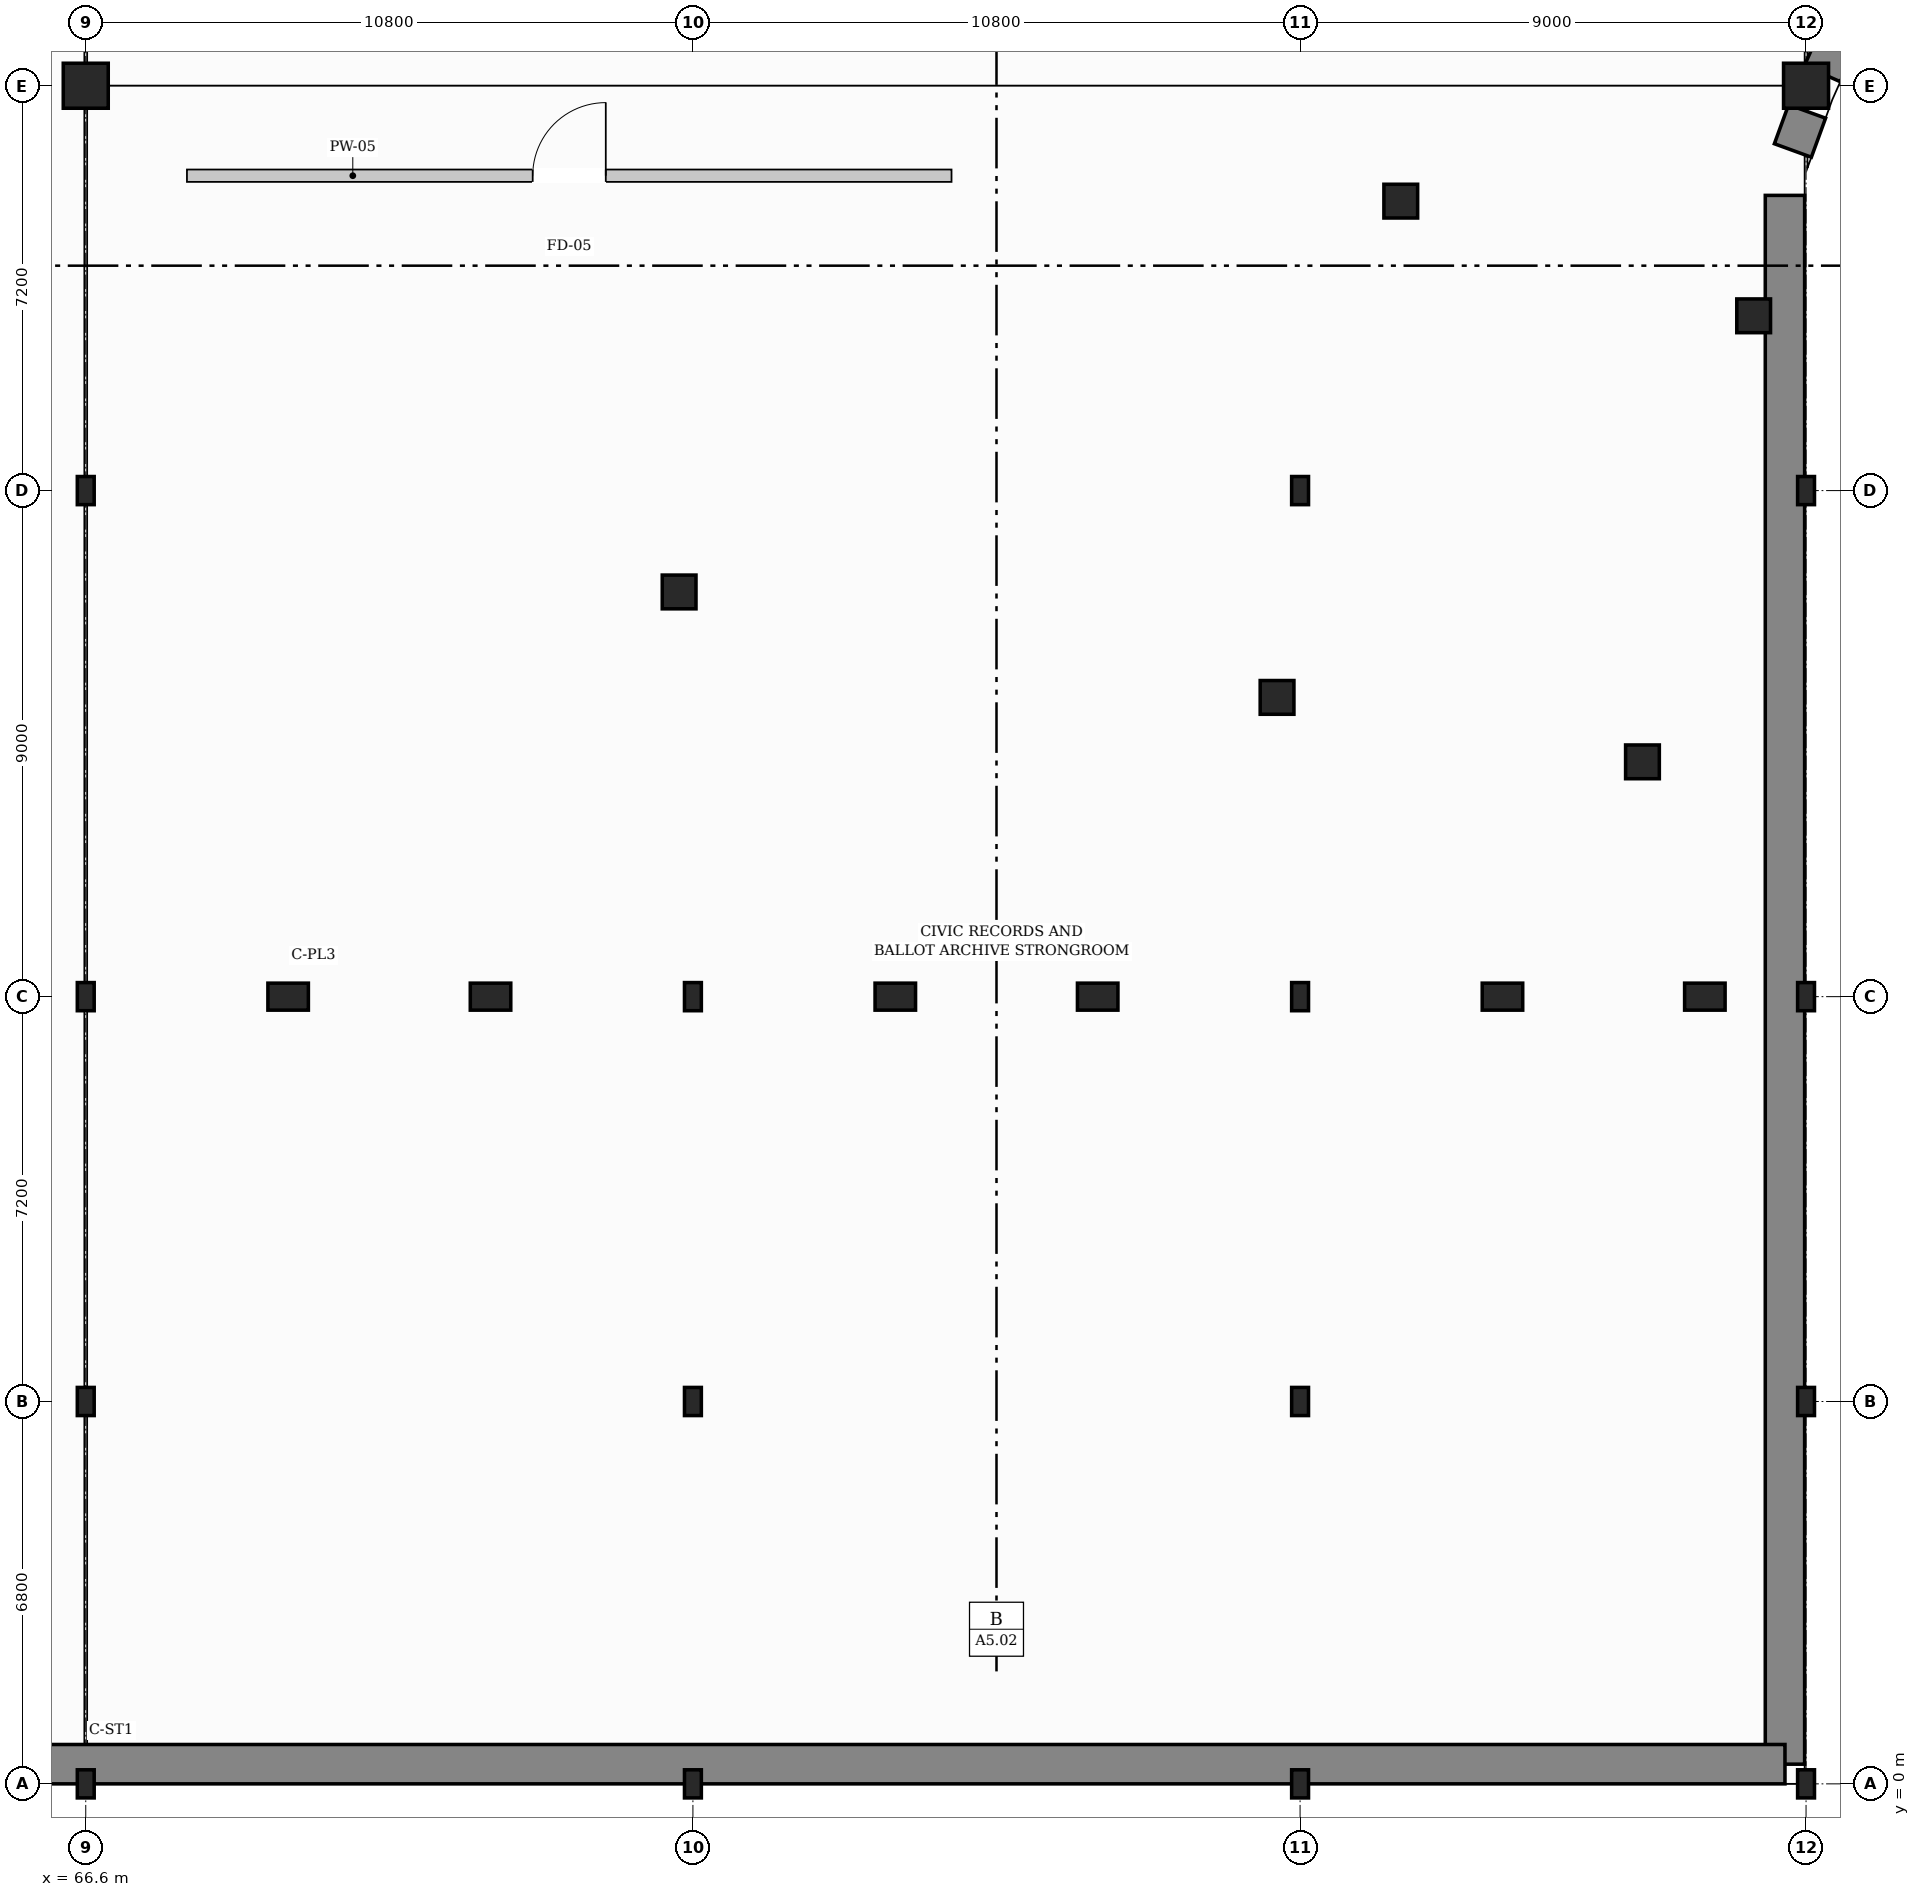
"""IFC4 building model, lengths in metres.
Left out: names, types, materials, properties, quantities, classifications, styles, units other than length and angle.
Written with IfcOpenShell. Run it as: python <this file> out.ifc"""

import sys

from ifc_helpers import new_model, si_unit, direction, frame, frame_2d, origin, origin_2d, place, context, subcontext, project, spatial, rectangle, circle, i_section, extrude, element, fill, save


model = new_model("IFC4")
c1 = context("Model", 3, precision=1e-05, world=origin(), true_north=direction((0.0, 1.0)))
c2 = subcontext(c1, "Body", "Model", "MODEL_VIEW")
j1 = project(units=[si_unit("LENGTHUNIT", "METRE"), si_unit("PLANEANGLEUNIT", "RADIAN")], contexts=[c1])
p1 = place(None, origin())
s1 = spatial("IfcSite", under=j1, at=p1, CompositionType="ELEMENT")
p2 = place(p1, origin())
s2 = spatial("IfcBuilding", under=s1, at=p2, CompositionType="ELEMENT")
p3 = place(p2, frame((0.0, 0.0, -4.2)))
s3 = spatial("IfcBuildingStorey", under=s2, at=p3, CompositionType="ELEMENT", Elevation=-4.2)
for number, where, z_axis, x_axis in (
    (1, (89.991, 28.148, 0.0), (0.0, 0.0, 1.0), (1.0, 0.0, 0.0)),
    (2, (87.791, 19.322, 0.0), (0.0, 0.0, 1.0), (1.0, 0.0, 0.0)),
    (3, (77.155, 21.197, 0.0), (0.0, 0.0, 1.0), (1.0, 0.0, 0.0)),
    (4, (96.268, 26.108, 0.0), (0.0, 0.0, 1.0), (1.0, 0.0, 0.0)),
    (5, (94.29, 18.176, 0.0), (0.0, 0.0, 1.0), (1.0, 0.0, 0.0)),
):
    element("IfcColumn", number, at=place(p3, frame(where, z_axis=z_axis, x_axis=x_axis)), inside=s3, PredefinedType="COLUMN", context=c2, shape_type="SweptSolid", body=[
        extrude(circle(Radius=0.3, at=origin_2d()), origin(), (0.0, 0.0, 1.0), 4.2),
    ])
for number, where, z_axis, x_axis in (
    (6, (66.6, 0.0, 0.0), (0.0, 0.0, 1.0), (1.0, 0.0, 0.0)),
    (7, (66.6, 6.8, 0.0), (0.0, 0.0, 1.0), (1.0, 0.0, 0.0)),
    (8, (66.6, 14.0, 0.0), (0.0, 0.0, 1.0), (1.0, 0.0, 0.0)),
    (9, (66.6, 23.0, 0.0), (0.0, 0.0, 1.0), (1.0, 0.0, 0.0)),
):
    element("IfcColumn", number, at=place(p3, frame(where, z_axis=z_axis, x_axis=x_axis)), inside=s3, PredefinedType="COLUMN", context=c2, shape_type="SweptSolid", body=[
        extrude(i_section(OverallWidth=0.3, OverallDepth=0.5, WebThickness=0.014, FlangeThickness=0.028, FilletRadius=0.027, at=origin_2d()), origin(), (0.0, 0.0, 1.0), 4.2),
    ])
p4 = place(p3, frame((66.6, 30.2, 0.0), z_axis=(0.0, 0.0, 1.0), x_axis=(1.0, 0.0, 0.0)))
e10 = element("IfcColumn", 10, at=p4, inside=s3, PredefinedType="COLUMN", context=c2, shape_type="SweptSolid", body=[
    extrude(rectangle(XDim=0.8, YDim=0.8, at=origin_2d()), origin(), (0.0, 0.0, 1.0), 4.2),
])
for number, where, z_axis, x_axis in (
    (11, (77.4, 0.0, 0.0), (0.0, 0.0, 1.0), (1.0, 0.0, 0.0)),
    (12, (77.4, 6.8, 0.0), (0.0, 0.0, 1.0), (1.0, 0.0, 0.0)),
    (13, (77.4, 14.0, 0.0), (0.0, 0.0, 1.0), (1.0, 0.0, 0.0)),
    (14, (88.2, 0.0, 0.0), (0.0, 0.0, 1.0), (1.0, 0.0, 0.0)),
    (15, (88.2, 6.8, 0.0), (0.0, 0.0, 1.0), (1.0, 0.0, 0.0)),
    (16, (88.2, 14.0, 0.0), (0.0, 0.0, 1.0), (1.0, 0.0, 0.0)),
    (17, (88.2, 23.0, 0.0), (0.0, 0.0, 1.0), (1.0, 0.0, 0.0)),
    (18, (97.2, 0.0, 0.0), (0.0, 0.0, 1.0), (1.0, 0.0, 0.0)),
    (19, (97.2, 6.8, 0.0), (0.0, 0.0, 1.0), (1.0, 0.0, 0.0)),
    (20, (97.2, 14.0, 0.0), (0.0, 0.0, 1.0), (1.0, 0.0, 0.0)),
    (21, (97.2, 23.0, 0.0), (0.0, 0.0, 1.0), (1.0, 0.0, 0.0)),
):
    element("IfcColumn", number, at=place(p3, frame(where, z_axis=z_axis, x_axis=x_axis)), inside=s3, PredefinedType="COLUMN", context=c2, shape_type="SweptSolid", body=[
        extrude(i_section(OverallWidth=0.3, OverallDepth=0.5, WebThickness=0.014, FlangeThickness=0.028, FilletRadius=0.027, at=origin_2d()), origin(), (0.0, 0.0, 1.0), 4.2),
    ])
p5 = place(p3, frame((97.2, 30.2, 0.0), z_axis=(0.0, 0.0, 1.0), x_axis=(1.0, 0.0, 0.0)))
e22 = element("IfcColumn", 22, at=p5, inside=s3, PredefinedType="COLUMN", context=c2, shape_type="SweptSolid", body=[
    extrude(rectangle(XDim=0.8, YDim=0.8, at=origin_2d()), origin(), (0.0, 0.0, 1.0), 4.2),
])
for number, where, z_axis, x_axis in (
    (23, (70.2, 14.0, 0.0), (0.0, 0.0, 1.0), (1.0, 0.0, 0.0)),
    (24, (73.8, 14.0, 0.0), (0.0, 0.0, 1.0), (1.0, 0.0, 0.0)),
    (25, (81.0, 14.0, 0.0), (0.0, 0.0, 1.0), (1.0, 0.0, 0.0)),
    (26, (84.6, 14.0, 0.0), (0.0, 0.0, 1.0), (1.0, 0.0, 0.0)),
    (27, (91.8, 14.0, 0.0), (0.0, 0.0, 1.0), (1.0, 0.0, 0.0)),
    (28, (95.4, 14.0, 0.0), (0.0, 0.0, 1.0), (1.0, 0.0, 0.0)),
):
    element("IfcColumn", number, at=place(p3, frame(where, z_axis=z_axis, x_axis=x_axis)), inside=s3, PredefinedType="PILASTER", context=c2, shape_type="SweptSolid", body=[
        extrude(rectangle(XDim=0.72, YDim=0.48, at=origin_2d()), origin(), (0.0, 0.0, 1.0), 4.2),
    ])
p6 = place(p3, frame((98.869, 33.511, 0.0), z_axis=(0.0, 0.0, 1.0), x_axis=(-0.406813218317, -0.913511360303, 0.0)))
e29 = element("IfcWall", 29, at=p6, inside=s3, PredefinedType="SOLIDWALL", context=c2, shape_type="SweptSolid", body=[
    extrude(rectangle(XDim=3.39, YDim=0.7, at=frame_2d((1.695, 0.0))), origin(), (0.0, 0.0, 1.0), 3.84),
])
p7 = place(p3, frame((97.219, 29.743, 0.0), z_axis=(0.0, 0.0, 1.0), x_axis=(-0.342088035222, -0.939667907379, 0.0)))
e30 = element("IfcWall", 30, at=p7, inside=s3, PredefinedType="SOLIDWALL", context=c2, shape_type="SweptSolid", body=[
    extrude(rectangle(XDim=0.739, YDim=0.7, at=frame_2d((0.369, 0.0))), origin(), (0.0, 0.0, 1.0), 3.84),
])
p8 = place(p3, frame((96.825, 28.25, 0.0), z_axis=(0.0, 0.0, 1.0), x_axis=(0.0, -1.0, 0.0)))
e31 = element("IfcWall", 31, at=p8, inside=s3, PredefinedType="SOLIDWALL", context=c2, shape_type="SweptSolid", body=[
    extrude(rectangle(XDim=27.9, YDim=0.7, at=frame_2d((13.95, 0.0))), origin(), (0.0, 0.0, 1.0), 3.95),
])
p9 = place(p3, frame((96.825, 0.35, 0.0), z_axis=(0.0, 0.0, 1.0), x_axis=(-1.0, 0.0, 0.0)))
e32 = element("IfcWall", 32, at=p9, inside=s3, PredefinedType="SOLIDWALL", context=c2, shape_type="SweptSolid", body=[
    extrude(rectangle(XDim=96.475, YDim=0.7, at=frame_2d((48.237, 0.0))), origin(), (0.0, 0.0, 1.0), 3.84),
])
p10 = place(p3, frame((68.4, 28.6, 0.0), z_axis=(0.0, 0.0, 1.0), x_axis=(1.0, 0.0, 0.0)))
e33 = element("IfcWall", 33, at=p10, inside=s3, PredefinedType="PARTITIONING", context=c2, shape_type="SweptSolid", body=[
    extrude(rectangle(XDim=13.6, YDim=0.22, at=frame_2d((6.8, 0.0))), origin(), (0.0, 0.0, 1.0), 3.51),
])
p11 = place(p10, frame((6.15, 0.0, 0.0)))
e34 = element("IfcOpeningElement", 34, at=p11, cuts=e33, PredefinedType="OPENING", context=c2, shape_type="SweptSolid", body=[
    extrude(rectangle(XDim=1.3, YDim=2.15, at=frame_2d((0.65, 1.075))), frame((0.0, 0.12, 0.0), z_axis=(0.0, -1.0, 0.0), x_axis=(1.0, 0.0, 0.0)), (0.0, 0.0, 1.0), 0.24),
])
p12 = place(p11, origin())
e35 = element("IfcDoor", 35, at=p12, inside=s3, OperationType="SINGLE_SWING_RIGHT", PredefinedType="DOOR", context=c2, shape_type="SweptSolid", body=[
    extrude(rectangle(XDim=1.3, YDim=2.15, at=frame_2d((0.65, 1.075))), frame((0.0, 0.025, 0.0), z_axis=(0.0, -1.0, 0.0), x_axis=(1.0, 0.0, 0.0)), (0.0, 0.0, 1.0), 0.05),
])
fill(e34, e35)
save(model, sys.argv[1])
